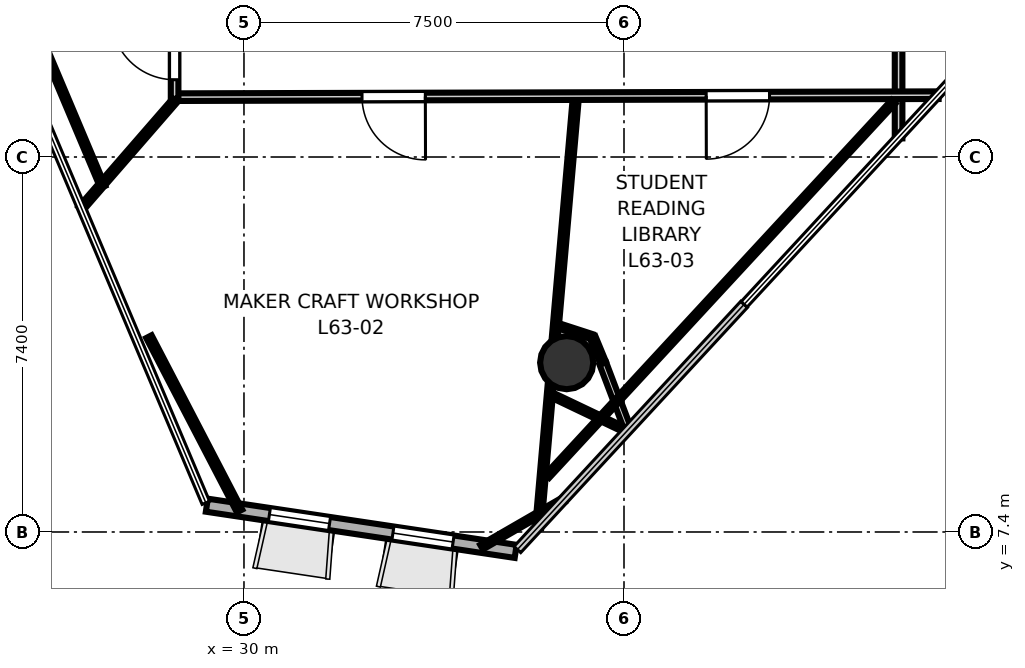
"""IFC4 building model, lengths in metres.
Left out: names, types, materials, properties, quantities, classifications, styles, units other than length and angle.
Written with IfcOpenShell. Run it as: python <this file> out.ifc"""

import sys

from ifc_helpers import new_model, si_unit, direction, frame, frame_2d, origin, origin_2d, place, context, subcontext, project, spatial, rectangle, hollow_circle, extrude, element, fill, save


model = new_model("IFC4")
c1 = context("Model", 3, precision=1e-05, world=origin(), true_north=direction((0.0, 1.0)))
c2 = subcontext(c1, "Body", "Model", "MODEL_VIEW")
j1 = project(units=[si_unit("LENGTHUNIT", "METRE"), si_unit("PLANEANGLEUNIT", "RADIAN")], contexts=[c1])
p1 = place(None, origin())
s1 = spatial("IfcSite", under=j1, at=p1, CompositionType="ELEMENT")
p2 = place(p1, origin())
s2 = spatial("IfcBuilding", under=s1, at=p2, CompositionType="ELEMENT")
p3 = place(p2, frame((0.0, 0.0, 246.4)))
s3 = spatial("IfcBuildingStorey", under=s2, at=p3, CompositionType="ELEMENT", Elevation=246.4)
p4 = place(p3, frame((36.369, 10.742, 0.0), z_axis=(0.0, 0.0, 1.0), x_axis=(1.0, 0.0, 0.0)))
e1 = element("IfcColumn", 1, at=p4, inside=s3, PredefinedType="COLUMN", context=c2, shape_type="SweptSolid", body=[
    extrude(hollow_circle(Radius=0.525, WallThickness=0.028, at=origin_2d()), origin(), (0.0, 0.0, 1.0), 3.7),
])
p5 = place(p3, frame((29.267, 7.929, 0.0), z_axis=(0.0, 0.0, 1.0), x_axis=(0.988998739346, -0.147923945232, 0.0)))
e2 = element("IfcWall", 2, at=p5, inside=s3, PredefinedType="SOLIDWALL", context=c2, shape_type="SweptSolid", body=[
    extrude(rectangle(XDim=6.163, YDim=0.26, at=frame_2d((3.082, 0.0))), origin(), (0.0, 0.0, 1.0), 3.52),
])
p6 = place(p5, frame((1.249, 0.0, 0.9)))
e3 = element("IfcOpeningElement", 3, at=p6, cuts=e2, PredefinedType="OPENING", context=c2, shape_type="SweptSolid", body=[
    extrude(rectangle(XDim=1.2, YDim=2.0, at=frame_2d((0.6, 1.0))), frame((0.0, 0.14, 0.0), z_axis=(0.0, -1.0, 0.0), x_axis=(1.0, 0.0, 0.0)), (0.0, 0.0, 1.0), 0.28),
])
p7 = place(p5, frame((3.714, 0.0, 0.9)))
e4 = element("IfcOpeningElement", 4, at=p7, cuts=e2, PredefinedType="OPENING", context=c2, shape_type="SweptSolid", body=[
    extrude(rectangle(XDim=1.2, YDim=2.0, at=frame_2d((0.6, 1.0))), frame((0.0, 0.14, 0.0), z_axis=(0.0, -1.0, 0.0), x_axis=(1.0, 0.0, 0.0)), (0.0, 0.0, 1.0), 0.28),
])
p8 = place(p3, frame((42.919, 17.98, 0.0), z_axis=(0.0, 0.0, 1.0), x_axis=(0.0, -1.0, 0.0)))
e5 = element("IfcWall", 5, at=p8, inside=s3, PredefinedType="PARTITIONING", context=c2, shape_type="SweptSolid", body=[
    extrude(rectangle(XDim=2.812, YDim=0.15, at=frame_2d((1.406, 0.0))), origin(), (0.0, 0.0, 1.0), 2.84),
])
p9 = place(p3, frame((43.709, 16.02, 0.0), z_axis=(0.0, 0.0, 1.0), x_axis=(-0.999996657873, -0.002585390319, 0.0)))
e6 = element("IfcWall", 6, at=p9, inside=s3, PredefinedType="PARTITIONING", context=c2, shape_type="SweptSolid", body=[
    extrude(rectangle(XDim=15.109, YDim=0.15, at=frame_2d((7.554, 0.0))), origin(), (0.0, 0.0, 1.0), 2.84),
])
p10 = place(p9, frame((10.129, 0.0, 0.0)))
e7 = element("IfcOpeningElement", 7, at=p10, cuts=e6, PredefinedType="OPENING", context=c2, shape_type="SweptSolid", body=[
    extrude(rectangle(XDim=1.25, YDim=2.2, at=frame_2d((0.625, 1.1))), frame((0.0, 0.085, 0.0), z_axis=(0.0, -1.0, 0.0), x_axis=(1.0, 0.0, 0.0)), (0.0, 0.0, 1.0), 0.17),
])
p11 = place(p9, frame((3.337, 0.0, 0.0)))
e8 = element("IfcOpeningElement", 8, at=p11, cuts=e6, PredefinedType="OPENING", context=c2, shape_type="SweptSolid", body=[
    extrude(rectangle(XDim=1.25, YDim=2.2, at=frame_2d((0.625, 1.1))), frame((0.0, 0.085, 0.0), z_axis=(0.0, -1.0, 0.0), x_axis=(1.0, 0.0, 0.0)), (0.0, 0.0, 1.0), 0.17),
])
p12 = place(p3, frame((28.631, 15.95, 0.0), z_axis=(0.0, 0.0, 1.0), x_axis=(0.0, 1.0, 0.0)))
e9 = element("IfcWall", 9, at=p12, inside=s3, PredefinedType="PARTITIONING", context=c2, shape_type="SweptSolid", body=[
    extrude(rectangle(XDim=2.0, YDim=0.15, at=frame_2d((1.0, 0.0))), origin(), (0.0, 0.0, 1.0), 2.84),
])
p13 = place(p12, frame((0.375, 0.0, 0.0)))
e10 = element("IfcOpeningElement", 10, at=p13, cuts=e9, PredefinedType="OPENING", context=c2, shape_type="SweptSolid", body=[
    extrude(rectangle(XDim=1.25, YDim=2.2, at=frame_2d((0.625, 1.1))), frame((0.0, 0.085, 0.0), z_axis=(0.0, -1.0, 0.0), x_axis=(1.0, 0.0, 0.0)), (0.0, 0.0, 1.0), 0.17),
])
p14 = place(p3, frame((28.615, 15.89, 0.0), z_axis=(0.0, 0.0, 1.0), x_axis=(-0.656005918299, -0.754755745362, 0.0)))
e11 = element("IfcWall", 11, at=p14, inside=s3, PredefinedType="PARTITIONING", context=c2, shape_type="SweptSolid", body=[
    extrude(rectangle(XDim=2.799, YDim=0.12, at=frame_2d((1.399, 0.0))), origin(), (0.0, 0.0, 1.0), 2.84),
])
p15 = place(p3, frame((27.214, 14.211, 0.0), z_axis=(0.0, 0.0, 1.0), x_axis=(-0.388823456639, 0.921312281242, 0.0)))
e12 = element("IfcWall", 12, at=p15, inside=s3, PredefinedType="PARTITIONING", context=c2, shape_type="SweptSolid", body=[
    extrude(rectangle(XDim=8.771, YDim=0.105, at=frame_2d((4.385, 0.0))), origin(), (0.0, 0.0, 1.0), 2.84),
])
p16 = place(p3, frame((36.298, 8.03, 0.0), z_axis=(0.0, 0.0, 1.0), x_axis=(-0.866165900759, -0.499756573106, 0.0)))
e13 = element("IfcWall", 13, at=p16, inside=s3, PredefinedType="PARTITIONING", context=c2, shape_type="SweptSolid", body=[
    extrude(rectangle(XDim=1.858, YDim=0.105, at=frame_2d((0.929, 0.0))), origin(), (0.0, 0.0, 1.0), 2.84),
])
p17 = place(p3, frame((29.913, 7.815, 0.0), z_axis=(0.0, 0.0, 1.0), x_axis=(-0.461461769984, 0.887160095385, 0.0)))
e14 = element("IfcWall", 14, at=p17, inside=s3, PredefinedType="PARTITIONING", context=c2, shape_type="SweptSolid", body=[
    extrude(rectangle(XDim=3.877, YDim=0.12, at=frame_2d((1.939, 0.0))), origin(), (0.0, 0.0, 1.0), 2.84),
])
p18 = place(p3, frame((36.541, 15.873, 0.0), z_axis=(0.0, 0.0, 1.0), x_axis=(-0.087164793469, -0.996193906215, 0.0)))
e15 = element("IfcWall", 15, at=p18, inside=s3, PredefinedType="PARTITIONING", context=c2, shape_type="SweptSolid", body=[
    extrude(rectangle(XDim=8.425, YDim=0.12, at=frame_2d((4.212, 0.0))), origin(), (0.0, 0.0, 1.0), 2.84),
])
p19 = place(p3, frame((36.155, 10.065, 0.0), z_axis=(0.0, 0.0, 1.0), x_axis=(0.902669244989, -0.430335025476, 0.0)))
e16 = element("IfcWall", 16, at=p19, inside=s3, PredefinedType="PARTITIONING", context=c2, shape_type="SweptSolid", body=[
    extrude(rectangle(XDim=1.558, YDim=0.105, at=frame_2d((0.779, 0.0))), origin(), (0.0, 0.0, 1.0), 2.84),
])
p20 = place(p3, frame((37.58, 9.415, 0.0), z_axis=(0.0, 0.0, 1.0), x_axis=(-0.355199520758, 0.934790511534, 0.0)))
e17 = element("IfcWall", 17, at=p20, inside=s3, PredefinedType="PARTITIONING", context=c2, shape_type="SweptSolid", body=[
    extrude(rectangle(XDim=1.404, YDim=0.14, at=frame_2d((0.702, 0.0))), origin(), (0.0, 0.0, 1.0), 2.84),
])
p21 = place(p3, frame((37.083, 10.754, 0.0), z_axis=(0.0, 0.0, 1.0), x_axis=(-0.382365504574, 0.924011158435, 0.0)))
e18 = element("IfcWall", 18, at=p21, inside=s3, PredefinedType="PARTITIONING", context=c2, shape_type="SweptSolid", body=[
    extrude(rectangle(XDim=0.524, YDim=0.12, at=frame_2d((0.262, 0.0))), origin(), (0.0, 0.0, 1.0), 2.84),
])
p22 = place(p3, frame((36.863, 11.256, 0.0), z_axis=(0.0, 0.0, 1.0), x_axis=(-0.95118515413, 0.30862080708, 0.0)))
e19 = element("IfcWall", 19, at=p22, inside=s3, PredefinedType="PARTITIONING", context=c2, shape_type="SweptSolid", body=[
    extrude(rectangle(XDim=0.617, YDim=0.105, at=frame_2d((0.309, 0.0))), origin(), (0.0, 0.0, 1.0), 2.84),
])
p23 = place(p3, frame((42.819, 15.891, 0.0), z_axis=(0.0, 0.0, 1.0), x_axis=(-0.679018444949, -0.734121210305, 0.0)))
e20 = element("IfcWall", 20, at=p23, inside=s3, PredefinedType="PARTITIONING", context=c2, shape_type="SweptSolid", body=[
    extrude(rectangle(XDim=10.062, YDim=0.105, at=frame_2d((5.031, 0.0))), origin(), (0.0, 0.0, 1.0), 2.84),
])
p24 = place(p13, origin())
e21 = element("IfcDoor", 21, at=p24, inside=s3, OperationType="SINGLE_SWING_RIGHT", PredefinedType="DOOR", context=c2, shape_type="SweptSolid", body=[
    extrude(rectangle(XDim=1.25, YDim=2.2, at=frame_2d((0.625, 1.1))), frame((0.0, 0.025, 0.0), z_axis=(0.0, -1.0, 0.0), x_axis=(1.0, 0.0, 0.0)), (0.0, 0.0, 1.0), 0.05),
])
fill(e10, e21)
p25 = place(p10, origin())
e22 = element("IfcDoor", 22, at=p25, inside=s3, OperationType="SINGLE_SWING_LEFT", PredefinedType="DOOR", context=c2, shape_type="SweptSolid", body=[
    extrude(rectangle(XDim=1.25, YDim=2.2, at=frame_2d((0.625, 1.1))), frame((0.0, 0.025, 0.0), z_axis=(0.0, -1.0, 0.0), x_axis=(1.0, 0.0, 0.0)), (0.0, 0.0, 1.0), 0.05),
])
fill(e7, e22)
p26 = place(p11, origin())
e23 = element("IfcDoor", 23, at=p26, inside=s3, OperationType="SINGLE_SWING_RIGHT", PredefinedType="DOOR", context=c2, shape_type="SweptSolid", body=[
    extrude(rectangle(XDim=1.25, YDim=2.2, at=frame_2d((0.625, 1.1))), frame((0.0, 0.025, 0.0), z_axis=(0.0, -1.0, 0.0), x_axis=(1.0, 0.0, 0.0)), (0.0, 0.0, 1.0), 0.05),
])
fill(e8, e23)
p27 = place(p6, origin())
e24 = element("IfcWindow", 24, at=p27, inside=s3, PartitioningType="SINGLE_PANEL", PredefinedType="WINDOW", context=c2, shape_type="SweptSolid", body=[
    extrude(rectangle(XDim=1.2, YDim=2.0, at=frame_2d((0.6, 1.0))), frame((0.0, 0.03, 0.0), z_axis=(0.0, -1.0, 0.0), x_axis=(1.0, 0.0, 0.0)), (0.0, 0.0, 1.0), 0.06),
])
fill(e3, e24)
p28 = place(p7, origin())
e25 = element("IfcWindow", 25, at=p28, inside=s3, PartitioningType="SINGLE_PANEL", PredefinedType="WINDOW", context=c2, shape_type="SweptSolid", body=[
    extrude(rectangle(XDim=1.2, YDim=2.0, at=frame_2d((0.6, 1.0))), frame((0.0, 0.03, 0.0), z_axis=(0.0, -1.0, 0.0), x_axis=(1.0, 0.0, 0.0)), (0.0, 0.0, 1.0), 0.06),
])
fill(e4, e25)
save(model, sys.argv[1])
